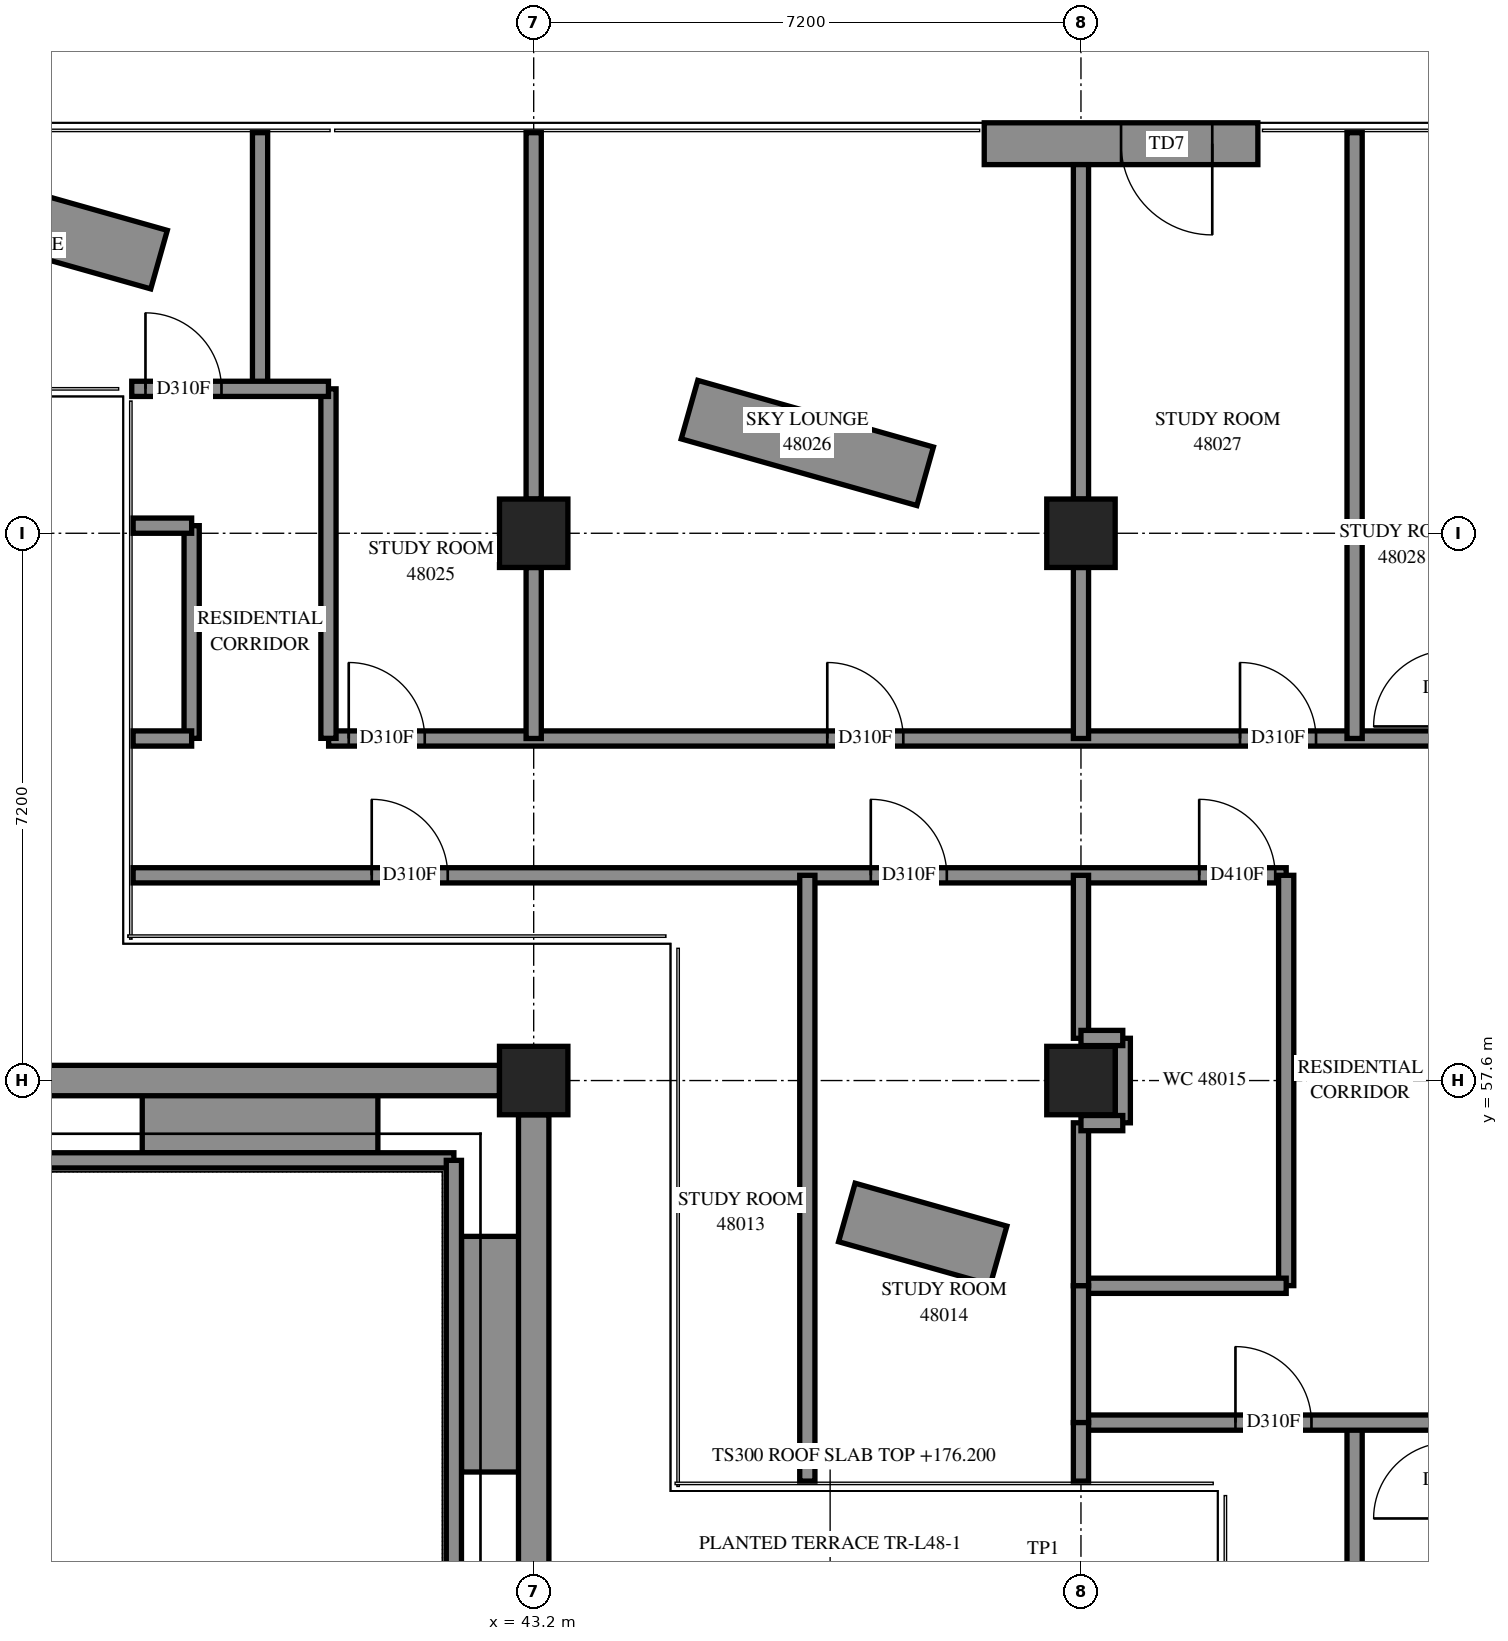
"""IFC4 building model, lengths in metres.
Left out: names, types, materials, properties, quantities, classifications, styles, units other than length and angle.
Written with IfcOpenShell. Run it as: python <this file> out.ifc"""

import sys

from ifc_helpers import new_model, si_unit, direction, frame, frame_2d, origin, origin_2d, place, context, subcontext, project, spatial, polyline, rectangle, outline, extrude, element, fill, save


model = new_model("IFC4")
c1 = context("Model", 3, precision=1e-05, world=origin(), true_north=direction((0.0, 1.0)))
c2 = subcontext(c1, "Body", "Model", "MODEL_VIEW")
j1 = project(units=[si_unit("LENGTHUNIT", "METRE"), si_unit("PLANEANGLEUNIT", "RADIAN")], contexts=[c1])
p1 = place(None, origin())
s1 = spatial("IfcSite", under=j1, at=p1, CompositionType="ELEMENT")
p2 = place(p1, origin())
s2 = spatial("IfcBuilding", under=s1, at=p2, CompositionType="ELEMENT")
p3 = place(p2, frame((0.0, 0.0, 176.2)))
s3 = spatial("IfcBuildingStorey", under=s2, at=p3, CompositionType="ELEMENT", Elevation=176.2)
for number, where, z_axis, x_axis in (
    (1, (43.2, 57.6, 0.0), (0.0, 0.0, 1.0), (1.0, 0.0, 0.0)),
    (2, (43.2, 64.8, 0.0), (0.0, 0.0, 1.0), (1.0, 0.0, 0.0)),
    (3, (50.4, 57.6, 0.0), (0.0, 0.0, 1.0), (1.0, 0.0, 0.0)),
    (4, (50.4, 64.8, 0.0), (0.0, 0.0, 1.0), (1.0, 0.0, 0.0)),
):
    element("IfcColumn", number, at=place(p3, frame(where, z_axis=z_axis, x_axis=x_axis)), inside=s3, PredefinedType="COLUMN", context=c2, shape_type="SweptSolid", body=[
        extrude(rectangle(XDim=0.9, YDim=0.9, at=origin_2d()), origin(), (0.0, 0.0, 1.0), 3.9),
    ])
p4 = place(p3, frame((52.727, 69.925, 0.0), z_axis=(0.0, 0.0, 1.0), x_axis=(-1.0, 0.0, 0.0)))
e5 = element("IfcWall", 5, at=p4, inside=s3, PredefinedType="SOLIDWALL", context=c2, shape_type="SweptSolid", body=[
    extrude(rectangle(XDim=3.6, YDim=0.55, at=frame_2d((1.8, 0.0))), origin(), (0.0, 0.0, 1.0), 3.9),
])
p5 = place(p4, frame((0.6, 0.0, 0.0)))
e6 = element("IfcOpeningElement", 6, at=p5, cuts=e5, PredefinedType="OPENING", context=c2, shape_type="SweptSolid", body=[
    extrude(rectangle(XDim=1.2, YDim=2.4, at=frame_2d((0.6, 1.2))), frame((0.0, 0.285, 0.0), z_axis=(0.0, -1.0, 0.0), x_axis=(1.0, 0.0, 0.0)), (0.0, 0.0, 1.0), 0.57),
])
for number, where, z_axis, x_axis in (
    (7, (38.05, 57.05, 0.0), (0.0, 0.0, 1.0), (1.0, 0.0, 0.0)),
    (8, (42.65, 55.55, 0.0), (0.0, 0.0, 1.0), (0.0, -1.0, 0.0)),
):
    element("IfcWall", number, at=place(p3, frame(where, z_axis=z_axis, x_axis=x_axis)), inside=s3, PredefinedType="SOLIDWALL", context=c2, shape_type="SweptSolid", body=[
        extrude(rectangle(XDim=3.1, YDim=0.8, at=frame_2d((1.55, 0.0))), origin(), (0.0, 0.0, 1.0), 0.65),
    ])
p6 = place(p3, frame((38.271, 68.4, 0.0), z_axis=(0.0, 0.0, 1.0), x_axis=(-0.96225946, 0.2721336649, 0.0)))
e9 = element("IfcWall", 9, at=p6, inside=s3, PredefinedType="SOLIDWALL", context=c2, shape_type="SweptSolid", body=[
    extrude(rectangle(XDim=5.561, YDim=0.8, at=frame_2d((2.78, 0.0))), origin(), (0.0, 0.0, 1.0), 0.65),
])
p7 = place(p3, frame((34.95, 56.55, 0.0), z_axis=(0.0, 0.0, 1.0), x_axis=(1.0, 0.0, 0.0)))
e10 = element("IfcWall", 10, at=p7, inside=s3, PredefinedType="SOLIDWALL", context=c2, shape_type="SweptSolid", body=[
    extrude(outline(polyline([(-0.1, -0.1), (7.1, -0.1), (7.3, 0.1), (0.1, 0.1), (-0.1, -0.1)])), origin(), (0.0, 0.0, 1.0), 4.2),
])
p8 = place(p3, frame((42.15, 56.55, 0.0), z_axis=(0.0, 0.0, 1.0), x_axis=(0.0, -1.0, 0.0)))
e11 = element("IfcWall", 11, at=p8, inside=s3, PredefinedType="SOLIDWALL", context=c2, shape_type="SweptSolid", body=[
    extrude(outline(polyline([(0.1, -0.1), (7.3, -0.1), (7.1, 0.1), (-0.1, 0.1), (0.1, -0.1)])), origin(), (0.0, 0.0, 1.0), 4.2),
])
p9 = place(p3, frame((37.93, 60.3, 0.0), z_axis=(0.0, 0.0, 1.0), x_axis=(1.0, 0.0, 0.0)))
e12 = element("IfcWall", 12, at=p9, inside=s3, PredefinedType="PARTITIONING", context=c2, shape_type="SweptSolid", body=[
    extrude(rectangle(XDim=15.17, YDim=0.2, at=frame_2d((7.585, 0.0))), origin(), (0.0, 0.0, 1.0), 3.9),
])
p10 = place(p9, frame((3.139, 0.0, 0.0)))
e13 = element("IfcOpeningElement", 13, at=p10, cuts=e12, PredefinedType="OPENING", context=c2, shape_type="SweptSolid", body=[
    extrude(rectangle(XDim=1.0, YDim=2.1, at=frame_2d((0.5, 1.05))), frame((0.0, 0.11, 0.0), z_axis=(0.0, -1.0, 0.0), x_axis=(1.0, 0.0, 0.0)), (0.0, 0.0, 1.0), 0.22),
])
p11 = place(p9, frame((9.705, 0.0, 0.0)))
e14 = element("IfcOpeningElement", 14, at=p11, cuts=e12, PredefinedType="OPENING", context=c2, shape_type="SweptSolid", body=[
    extrude(rectangle(XDim=1.0, YDim=2.1, at=frame_2d((0.5, 1.05))), frame((0.0, 0.11, 0.0), z_axis=(0.0, -1.0, 0.0), x_axis=(1.0, 0.0, 0.0)), (0.0, 0.0, 1.0), 0.22),
])
p12 = place(p9, frame((14.026, 0.0, 0.0)))
e15 = element("IfcOpeningElement", 15, at=p12, cuts=e12, PredefinedType="OPENING", context=c2, shape_type="SweptSolid", body=[
    extrude(rectangle(XDim=1.0, YDim=2.1, at=frame_2d((0.5, 1.05))), frame((0.0, 0.11, 0.0), z_axis=(0.0, -1.0, 0.0), x_axis=(1.0, 0.0, 0.0)), (0.0, 0.0, 1.0), 0.22),
])
p13 = place(p3, frame((40.502, 62.1, 0.0), z_axis=(0.0, 0.0, 1.0), x_axis=(1.0, 0.0, 0.0)))
e16 = element("IfcWall", 16, at=p13, inside=s3, PredefinedType="PARTITIONING", context=c2, shape_type="SweptSolid", body=[
    extrude(rectangle(XDim=14.748, YDim=0.2, at=frame_2d((7.374, 0.0))), origin(), (0.0, 0.0, 1.0), 3.9),
])
p14 = place(p13, frame((0.265, 0.0, 0.0)))
e17 = element("IfcOpeningElement", 17, at=p14, cuts=e16, PredefinedType="OPENING", context=c2, shape_type="SweptSolid", body=[
    extrude(rectangle(XDim=1.0, YDim=2.1, at=frame_2d((0.5, 1.05))), frame((0.0, 0.11, 0.0), z_axis=(0.0, -1.0, 0.0), x_axis=(1.0, 0.0, 0.0)), (0.0, 0.0, 1.0), 0.22),
])
p15 = place(p13, frame((6.561, 0.0, 0.0)))
e18 = element("IfcOpeningElement", 18, at=p15, cuts=e16, PredefinedType="OPENING", context=c2, shape_type="SweptSolid", body=[
    extrude(rectangle(XDim=1.0, YDim=2.1, at=frame_2d((0.5, 1.05))), frame((0.0, 0.11, 0.0), z_axis=(0.0, -1.0, 0.0), x_axis=(1.0, 0.0, 0.0)), (0.0, 0.0, 1.0), 0.22),
])
p16 = place(p13, frame((11.991, 0.0, 0.0)))
e19 = element("IfcOpeningElement", 19, at=p16, cuts=e16, PredefinedType="OPENING", context=c2, shape_type="SweptSolid", body=[
    extrude(rectangle(XDim=1.0, YDim=2.1, at=frame_2d((0.5, 1.05))), frame((0.0, 0.11, 0.0), z_axis=(0.0, -1.0, 0.0), x_axis=(1.0, 0.0, 0.0)), (0.0, 0.0, 1.0), 0.22),
])
for number, where, z_axis, x_axis in (
    (20, (46.8, 52.33, 0.0), (0.0, 0.0, 1.0), (0.0, 1.0, 0.0)),
    (21, (54.0, 45.13, 0.0), (0.0, 0.0, 1.0), (0.0, 1.0, 0.0)),
    (22, (54.0, 62.1, 0.0), (0.0, 0.0, 1.0), (0.0, 1.0, 0.0)),
):
    element("IfcWall", number, at=place(p3, frame(where, z_axis=z_axis, x_axis=x_axis)), inside=s3, PredefinedType="PARTITIONING", context=c2, shape_type="SweptSolid", body=[
        extrude(rectangle(XDim=7.97, YDim=0.2, at=frame_2d((3.985, 0.0))), origin(), (0.0, 0.0, 1.0), 3.9),
    ])
p17 = place(p3, frame((53.1, 54.902, 0.0), z_axis=(0.0, 0.0, 1.0), x_axis=(0.0, 1.0, 0.0)))
e23 = element("IfcWall", 23, at=p17, inside=s3, PredefinedType="PARTITIONING", context=c2, shape_type="SweptSolid", body=[
    extrude(rectangle(XDim=5.398, YDim=0.2, at=frame_2d((2.699, 0.0))), origin(), (0.0, 0.0, 1.0), 3.9),
])
p18 = place(p3, frame((50.4, 53.1, 0.0), z_axis=(0.0, 0.0, 1.0), x_axis=(1.0, 0.0, 0.0)))
e24 = element("IfcWall", 24, at=p18, inside=s3, PredefinedType="PARTITIONING", context=c2, shape_type="SweptSolid", body=[
    extrude(rectangle(XDim=4.85, YDim=0.2, at=frame_2d((2.425, 0.0))), origin(), (0.0, 0.0, 1.0), 3.9),
])
p19 = place(p18, frame((2.033, 0.0, 0.0)))
e25 = element("IfcOpeningElement", 25, at=p19, cuts=e24, PredefinedType="OPENING", context=c2, shape_type="SweptSolid", body=[
    extrude(rectangle(XDim=1.0, YDim=2.1, at=frame_2d((0.5, 1.05))), frame((0.0, 0.11, 0.0), z_axis=(0.0, -1.0, 0.0), x_axis=(1.0, 0.0, 0.0)), (0.0, 0.0, 1.0), 0.22),
])
p20 = place(p3, frame((43.2, 65.25, 0.0), z_axis=(0.0, 0.0, 1.0), x_axis=(0.0, 1.0, 0.0)))
e26 = element("IfcWall", 26, at=p20, inside=s3, PredefinedType="PARTITIONING", context=c2, shape_type="SweptSolid", body=[
    extrude(rectangle(XDim=4.82, YDim=0.2, at=frame_2d((2.41, 0.0))), origin(), (0.0, 0.0, 1.0), 3.9),
])
p21 = place(p3, frame((50.4, 65.25, 0.0), z_axis=(0.0, 0.0, 1.0), x_axis=(0.0, 1.0, 0.0)))
e27 = element("IfcWall", 27, at=p21, inside=s3, PredefinedType="PARTITIONING", context=c2, shape_type="SweptSolid", body=[
    extrude(rectangle(XDim=4.4, YDim=0.2, at=frame_2d((2.2, 0.0))), origin(), (0.0, 0.0, 1.0), 3.9),
])
p22 = place(p3, frame((40.5, 62.102, 0.0), z_axis=(0.0, 0.0, 1.0), x_axis=(0.0, 1.0, 0.0)))
e28 = element("IfcWall", 28, at=p22, inside=s3, PredefinedType="PARTITIONING", context=c2, shape_type="SweptSolid", body=[
    extrude(rectangle(XDim=4.598, YDim=0.2, at=frame_2d((2.299, 0.0))), origin(), (0.0, 0.0, 1.0), 3.9),
])
p23 = place(p3, frame((39.6, 66.7, 0.0), z_axis=(0.0, 0.0, 1.0), x_axis=(0.0, 1.0, 0.0)))
e29 = element("IfcWall", 29, at=p23, inside=s3, PredefinedType="PARTITIONING", context=c2, shape_type="SweptSolid", body=[
    extrude(rectangle(XDim=3.37, YDim=0.2, at=frame_2d((1.685, 0.0))), origin(), (0.0, 0.0, 1.0), 3.9),
])
p24 = place(p3, frame((38.7, 62.102, 0.0), z_axis=(0.0, 0.0, 1.0), x_axis=(0.0, 1.0, 0.0)))
e30 = element("IfcWall", 30, at=p24, inside=s3, PredefinedType="PARTITIONING", context=c2, shape_type="SweptSolid", body=[
    extrude(rectangle(XDim=2.798, YDim=0.2, at=frame_2d((1.399, 0.0))), origin(), (0.0, 0.0, 1.0), 3.9),
])
p25 = place(p3, frame((50.4, 54.9, 0.0), z_axis=(0.0, 0.0, 1.0), x_axis=(1.0, 0.0, 0.0)))
e31 = element("IfcWall", 31, at=p25, inside=s3, PredefinedType="PARTITIONING", context=c2, shape_type="SweptSolid", body=[
    extrude(rectangle(XDim=2.7, YDim=0.2, at=frame_2d((1.35, 0.0))), origin(), (0.0, 0.0, 1.0), 3.9),
])
p26 = place(p3, frame((37.912, 66.7, 0.0), z_axis=(0.0, 0.0, 1.0), x_axis=(1.0, 0.0, 0.0)))
e32 = element("IfcWall", 32, at=p26, inside=s3, PredefinedType="PARTITIONING", context=c2, shape_type="SweptSolid", body=[
    extrude(rectangle(XDim=2.588, YDim=0.2, at=frame_2d((1.294, 0.0))), origin(), (0.0, 0.0, 1.0), 3.9),
])
p27 = place(p26, frame((0.18, 0.0, 0.0)))
e33 = element("IfcOpeningElement", 33, at=p27, cuts=e32, PredefinedType="OPENING", context=c2, shape_type="SweptSolid", body=[
    extrude(rectangle(XDim=1.0, YDim=2.1, at=frame_2d((0.5, 1.05))), frame((0.0, 0.11, 0.0), z_axis=(0.0, -1.0, 0.0), x_axis=(1.0, 0.0, 0.0)), (0.0, 0.0, 1.0), 0.22),
])
for number, where, z_axis, x_axis in (
    (34, (43.2, 62.1, 0.0), (0.0, 0.0, 1.0), (0.0, 1.0, 0.0)),
    (35, (50.4, 62.1, 0.0), (0.0, 0.0, 1.0), (0.0, 1.0, 0.0)),
):
    element("IfcWall", number, at=place(p3, frame(where, z_axis=z_axis, x_axis=x_axis)), inside=s3, PredefinedType="PARTITIONING", context=c2, shape_type="SweptSolid", body=[
        extrude(rectangle(XDim=2.25, YDim=0.2, at=frame_2d((1.125, 0.0))), origin(), (0.0, 0.0, 1.0), 3.9),
    ])
for number, where, z_axis, x_axis in (
    (36, (50.4, 54.9, 0.0), (0.0, 0.0, 1.0), (0.0, 1.0, 0.0)),
    (37, (50.4, 58.156, 0.0), (0.0, 0.0, 1.0), (0.0, 1.0, 0.0)),
):
    element("IfcWall", number, at=place(p3, frame(where, z_axis=z_axis, x_axis=x_axis)), inside=s3, PredefinedType="PARTITIONING", context=c2, shape_type="SweptSolid", body=[
        extrude(rectangle(XDim=2.144, YDim=0.2, at=frame_2d((1.072, 0.0))), origin(), (0.0, 0.0, 1.0), 3.9),
    ])
p28 = place(p3, frame((50.4, 53.1, 0.0), z_axis=(0.0, 0.0, 1.0), x_axis=(0.0, 1.0, 0.0)))
e38 = element("IfcWall", 38, at=p28, inside=s3, PredefinedType="PARTITIONING", context=c2, shape_type="SweptSolid", body=[
    extrude(rectangle(XDim=1.8, YDim=0.2, at=frame_2d((0.9, 0.0))), origin(), (0.0, 0.0, 1.0), 3.9),
])
p29 = place(p3, frame((50.95, 57.044, 0.0), z_axis=(0.0, 0.0, 1.0), x_axis=(0.0, 1.0, 0.0)))
e39 = element("IfcWall", 39, at=p29, inside=s3, PredefinedType="PARTITIONING", context=c2, shape_type="SweptSolid", body=[
    extrude(rectangle(XDim=1.112, YDim=0.2, at=frame_2d((0.556, 0.0))), origin(), (0.0, 0.0, 1.0), 3.9),
])
for number, where, z_axis, x_axis in (
    (40, (37.93, 62.1, 0.0), (0.0, 0.0, 1.0), (1.0, 0.0, 0.0)),
    (41, (37.93, 64.9, 0.0), (0.0, 0.0, 1.0), (1.0, 0.0, 0.0)),
    (42, (50.4, 52.33, 0.0), (0.0, 0.0, 1.0), (0.0, 1.0, 0.0)),
):
    element("IfcWall", number, at=place(p3, frame(where, z_axis=z_axis, x_axis=x_axis)), inside=s3, PredefinedType="PARTITIONING", context=c2, shape_type="SweptSolid", body=[
        extrude(rectangle(XDim=0.77, YDim=0.2, at=frame_2d((0.385, 0.0))), origin(), (0.0, 0.0, 1.0), 3.9),
    ])
for number, where, z_axis, x_axis in (
    (43, (50.4, 58.16, 0.0), (0.0, 0.0, 1.0), (1.0, 0.0, 0.0)),
    (44, (50.4, 57.04, 0.0), (0.0, 0.0, 1.0), (1.0, 0.0, 0.0)),
):
    element("IfcWall", number, at=place(p3, frame(where, z_axis=z_axis, x_axis=x_axis)), inside=s3, PredefinedType="PARTITIONING", context=c2, shape_type="SweptSolid", body=[
        extrude(rectangle(XDim=0.55, YDim=0.2, at=frame_2d((0.275, 0.0))), origin(), (0.0, 0.0, 1.0), 3.9),
    ])
p30 = place(p3, frame((48.35, 65.55, 0.0), z_axis=(0.0, 0.0, 1.0), x_axis=(-0.9622595861, 0.2721332191, 0.0)))
e45 = element("IfcWall", 45, at=p30, inside=s3, PredefinedType="SOLIDWALL", context=c2, shape_type="SweptSolid", body=[
    extrude(outline(polyline([(0.0, -0.4), (3.222, -0.4), (3.222, 0.4), (0.0, 0.4), (0.0, -0.4)])), origin(), (0.0, 0.0, 1.0), 0.65),
])
p31 = place(p3, frame((49.316, 55.3, 0.0), z_axis=(0.0, 0.0, 1.0), x_axis=(-0.962267982, 0.2721035295, 0.0)))
e46 = element("IfcWall", 46, at=p31, inside=s3, PredefinedType="SOLIDWALL", context=c2, shape_type="SweptSolid", body=[
    extrude(outline(polyline([(0.0, -0.4), (2.075, -0.4), (2.075, 0.4), (0.0, 0.4), (0.0, -0.4)])), origin(), (0.0, 0.0, 1.0), 0.65),
])
p32 = place(p5, origin())
e47 = element("IfcDoor", 47, at=p32, inside=s3, OperationType="SINGLE_SWING_LEFT", PredefinedType="DOOR", context=c2, shape_type="SweptSolid", body=[
    extrude(rectangle(XDim=1.2, YDim=2.4, at=frame_2d((0.6, 1.2))), frame((0.0, 0.025, 0.0), z_axis=(0.0, -1.0, 0.0), x_axis=(1.0, 0.0, 0.0)), (0.0, 0.0, 1.0), 0.05),
])
fill(e6, e47)
p33 = place(p10, origin())
e48 = element("IfcDoor", 48, at=p33, inside=s3, OperationType="SINGLE_SWING_RIGHT", PredefinedType="DOOR", context=c2, shape_type="SweptSolid", body=[
    extrude(rectangle(XDim=1.0, YDim=2.1, at=frame_2d((0.5, 1.05))), frame((0.0, 0.025, 0.0), z_axis=(0.0, -1.0, 0.0), x_axis=(1.0, 0.0, 0.0)), (0.0, 0.0, 1.0), 0.05),
])
fill(e13, e48)
p34 = place(p11, origin())
e49 = element("IfcDoor", 49, at=p34, inside=s3, OperationType="SINGLE_SWING_RIGHT", PredefinedType="DOOR", context=c2, shape_type="SweptSolid", body=[
    extrude(rectangle(XDim=1.0, YDim=2.1, at=frame_2d((0.5, 1.05))), frame((0.0, 0.025, 0.0), z_axis=(0.0, -1.0, 0.0), x_axis=(1.0, 0.0, 0.0)), (0.0, 0.0, 1.0), 0.05),
])
fill(e14, e49)
p35 = place(p12, origin())
e50 = element("IfcDoor", 50, at=p35, inside=s3, OperationType="SINGLE_SWING_LEFT", PredefinedType="DOOR", context=c2, shape_type="SweptSolid", body=[
    extrude(rectangle(XDim=1.0, YDim=2.1, at=frame_2d((0.5, 1.05))), frame((0.0, 0.025, 0.0), z_axis=(0.0, -1.0, 0.0), x_axis=(1.0, 0.0, 0.0)), (0.0, 0.0, 1.0), 0.05),
])
fill(e15, e50)
p36 = place(p19, origin())
e51 = element("IfcDoor", 51, at=p36, inside=s3, OperationType="SINGLE_SWING_LEFT", PredefinedType="DOOR", context=c2, shape_type="SweptSolid", body=[
    extrude(rectangle(XDim=1.0, YDim=2.1, at=frame_2d((0.5, 1.05))), frame((0.0, 0.025, 0.0), z_axis=(0.0, -1.0, 0.0), x_axis=(1.0, 0.0, 0.0)), (0.0, 0.0, 1.0), 0.05),
])
fill(e25, e51)
p37 = place(p27, origin())
e52 = element("IfcDoor", 52, at=p37, inside=s3, OperationType="SINGLE_SWING_LEFT", PredefinedType="DOOR", context=c2, shape_type="SweptSolid", body=[
    extrude(rectangle(XDim=1.0, YDim=2.1, at=frame_2d((0.5, 1.05))), frame((0.0, 0.025, 0.0), z_axis=(0.0, -1.0, 0.0), x_axis=(1.0, 0.0, 0.0)), (0.0, 0.0, 1.0), 0.05),
])
fill(e33, e52)
p38 = place(p14, origin())
e53 = element("IfcDoor", 53, at=p38, inside=s3, OperationType="SINGLE_SWING_LEFT", PredefinedType="DOOR", context=c2, shape_type="SweptSolid", body=[
    extrude(rectangle(XDim=1.0, YDim=2.1, at=frame_2d((0.5, 1.05))), frame((0.0, 0.025, 0.0), z_axis=(0.0, -1.0, 0.0), x_axis=(1.0, 0.0, 0.0)), (0.0, 0.0, 1.0), 0.05),
])
fill(e17, e53)
p39 = place(p15, origin())
e54 = element("IfcDoor", 54, at=p39, inside=s3, OperationType="SINGLE_SWING_RIGHT", PredefinedType="DOOR", context=c2, shape_type="SweptSolid", body=[
    extrude(rectangle(XDim=1.0, YDim=2.1, at=frame_2d((0.5, 1.05))), frame((0.0, 0.025, 0.0), z_axis=(0.0, -1.0, 0.0), x_axis=(1.0, 0.0, 0.0)), (0.0, 0.0, 1.0), 0.05),
])
fill(e18, e54)
p40 = place(p16, origin())
e55 = element("IfcDoor", 55, at=p40, inside=s3, OperationType="SINGLE_SWING_RIGHT", PredefinedType="DOOR", context=c2, shape_type="SweptSolid", body=[
    extrude(rectangle(XDim=1.0, YDim=2.1, at=frame_2d((0.5, 1.05))), frame((0.0, 0.025, 0.0), z_axis=(0.0, -1.0, 0.0), x_axis=(1.0, 0.0, 0.0)), (0.0, 0.0, 1.0), 0.05),
])
fill(e19, e55)
save(model, sys.argv[1])
